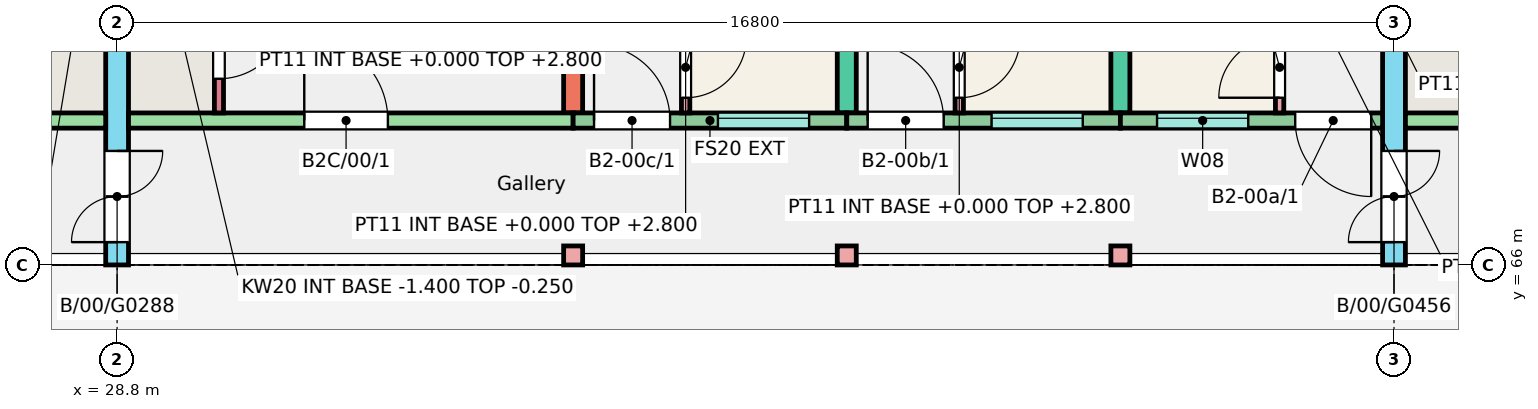
"""IFC4 building model, lengths in metres.
Left out: names, types, materials, properties, quantities, classifications, styles, units other than length and angle.
Written with IfcOpenShell. Run it as: python <this file> out.ifc"""

import sys

from ifc_helpers import new_model, si_unit, direction, frame, frame_2d, origin, origin_2d, place, context, subcontext, project, spatial, rectangle, extrude, element, fill, save


model = new_model("IFC4")
c1 = context("Model", 3, precision=1e-05, world=origin(), true_north=direction((0.0, 1.0)))
c2 = subcontext(c1, "Body", "Model", "MODEL_VIEW")
j1 = project(units=[si_unit("LENGTHUNIT", "METRE"), si_unit("PLANEANGLEUNIT", "RADIAN")], contexts=[c1])
p1 = place(None, origin())
s1 = spatial("IfcSite", under=j1, at=p1, CompositionType="ELEMENT")
p2 = place(p1, origin())
s2 = spatial("IfcBuilding", under=s1, at=p2, CompositionType="ELEMENT")
p3 = place(p2, origin())
s3 = spatial("IfcBuildingStorey", under=s2, at=p3, CompositionType="ELEMENT", Elevation=0.0)
p4 = place(p3, frame((28.8, 66.0, -0.25), z_axis=(0.0, 0.0, 1.0), x_axis=(0.0, 1.0, 0.0)))
e1 = element("IfcWall", 1, at=p4, inside=s3, PredefinedType="SHEAR", context=c2, shape_type="SweptSolid", body=[
    extrude(rectangle(XDim=11.0, YDim=0.3, at=frame_2d((5.5, 0.0))), origin(), (0.0, 0.0, 1.0), 3.25),
])
p5 = place(p4, frame((0.3, 0.0, 0.25)))
e2 = element("IfcOpeningElement", 2, at=p5, cuts=e1, PredefinedType="OPENING", context=c2, shape_type="SweptSolid", body=[
    extrude(rectangle(XDim=1.2, YDim=2.1, at=frame_2d((0.6, 1.05))), frame((0.0, 0.16, 0.0), z_axis=(0.0, -1.0, 0.0), x_axis=(1.0, 0.0, 0.0)), (0.0, 0.0, 1.0), 0.32),
])
for number, where, z_axis, x_axis in (
    (3, (34.8, 68.0, -0.25), (0.0, 0.0, 1.0), (0.0, 1.0, 0.0)),
    (4, (38.4, 68.0, -0.25), (0.0, 0.0, 1.0), (0.0, 1.0, 0.0)),
    (5, (42.0, 68.0, -0.25), (0.0, 0.0, 1.0), (0.0, 1.0, 0.0)),
):
    element("IfcWall", number, at=place(p3, frame(where, z_axis=z_axis, x_axis=x_axis)), inside=s3, PredefinedType="SHEAR", context=c2, shape_type="SweptSolid", body=[
        extrude(rectangle(XDim=9.0, YDim=0.25, at=frame_2d((4.5, 0.0))), origin(), (0.0, 0.0, 1.0), 3.25),
    ])
p6 = place(p3, frame((45.6, 66.0, -0.25), z_axis=(0.0, 0.0, 1.0), x_axis=(0.0, 1.0, 0.0)))
e6 = element("IfcWall", 6, at=p6, inside=s3, PredefinedType="SHEAR", context=c2, shape_type="SweptSolid", body=[
    extrude(rectangle(XDim=11.0, YDim=0.3, at=frame_2d((5.5, 0.0))), origin(), (0.0, 0.0, 1.0), 3.25),
])
p7 = place(p6, frame((0.3, 0.0, 0.25)))
e7 = element("IfcOpeningElement", 7, at=p7, cuts=e6, PredefinedType="OPENING", context=c2, shape_type="SweptSolid", body=[
    extrude(rectangle(XDim=1.2, YDim=2.1, at=frame_2d((0.6, 1.05))), frame((0.0, 0.16, 0.0), z_axis=(0.0, -1.0, 0.0), x_axis=(1.0, 0.0, 0.0)), (0.0, 0.0, 1.0), 0.32),
])
p8 = place(p3, frame((22.8, 67.9, -0.25), z_axis=(0.0, 0.0, 1.0), x_axis=(1.0, 0.0, 0.0)))
e8 = element("IfcWall", 8, at=p8, inside=s3, PredefinedType="SHEAR", context=c2, shape_type="SweptSolid", body=[
    extrude(rectangle(XDim=5.85, YDim=0.2, at=frame_2d((2.925, 0.0))), origin(), (0.0, 0.0, 1.0), 3.25),
])
p9 = place(p8, frame((2.438, 0.0, 0.25)))
e9 = element("IfcOpeningElement", 9, at=p9, cuts=e8, PredefinedType="OPENING", context=c2, shape_type="SweptSolid", body=[
    extrude(rectangle(XDim=1.1, YDim=2.1, at=frame_2d((0.55, 1.05))), frame((0.0, 0.11, 0.0), z_axis=(0.0, -1.0, 0.0), x_axis=(1.0, 0.0, 0.0)), (0.0, 0.0, 1.0), 0.22),
])
p10 = place(p3, frame((28.95, 67.9, -0.25), z_axis=(0.0, 0.0, 1.0), x_axis=(1.0, 0.0, 0.0)))
e10 = element("IfcWall", 10, at=p10, inside=s3, PredefinedType="SHEAR", context=c2, shape_type="SweptSolid", body=[
    extrude(rectangle(XDim=5.85, YDim=0.2, at=frame_2d((2.925, 0.0))), origin(), (0.0, 0.0, 1.0), 3.25),
])
p11 = place(p10, frame((2.312, 0.0, 0.25)))
e11 = element("IfcOpeningElement", 11, at=p11, cuts=e10, PredefinedType="OPENING", context=c2, shape_type="SweptSolid", body=[
    extrude(rectangle(XDim=1.1, YDim=2.1, at=frame_2d((0.55, 1.05))), frame((0.0, 0.11, 0.0), z_axis=(0.0, -1.0, 0.0), x_axis=(1.0, 0.0, 0.0)), (0.0, 0.0, 1.0), 0.22),
])
p12 = place(p3, frame((30.14, 68.0, -0.25), z_axis=(0.0, 0.0, 1.0), x_axis=(0.0, 1.0, 0.0)))
e12 = element("IfcWall", 12, at=p12, inside=s3, PredefinedType="SHEAR", context=c2, shape_type="SweptSolid", body=[
    extrude(rectangle(XDim=1.72, YDim=0.12, at=frame_2d((0.86, 0.0))), origin(), (0.0, 0.0, 1.0), 3.25),
])
p13 = place(p12, frame((0.45, 0.0, 0.25)))
e13 = element("IfcOpeningElement", 13, at=p13, cuts=e12, PredefinedType="OPENING", context=c2, shape_type="SweptSolid", body=[
    extrude(rectangle(XDim=0.9, YDim=2.1, at=frame_2d((0.45, 1.05))), frame((0.0, 0.07, 0.0), z_axis=(0.0, -1.0, 0.0), x_axis=(1.0, 0.0, 0.0)), (0.0, 0.0, 1.0), 0.14),
])
p14 = place(p3, frame((34.8, 67.9, -0.25), z_axis=(0.0, 0.0, 1.0), x_axis=(1.0, 0.0, 0.0)))
e14 = element("IfcWall", 14, at=p14, inside=s3, PredefinedType="SOLIDWALL", context=c2, shape_type="SweptSolid", body=[
    extrude(rectangle(XDim=3.6, YDim=0.2, at=frame_2d((1.8, 0.0))), origin(), (0.0, 0.0, 1.0), 3.25),
])
p15 = place(p14, frame((1.905, 0.0, 1.35)))
e15 = element("IfcOpeningElement", 15, at=p15, cuts=e14, PredefinedType="OPENING", context=c2, shape_type="SweptSolid", body=[
    extrude(rectangle(XDim=1.2, YDim=1.3, at=frame_2d((0.6, 0.65))), frame((0.0, 0.11, 0.0), z_axis=(0.0, -1.0, 0.0), x_axis=(1.0, 0.0, 0.0)), (0.0, 0.0, 1.0), 0.22),
])
p16 = place(p14, frame((0.275, 0.0, 0.25)))
e16 = element("IfcOpeningElement", 16, at=p16, cuts=e14, PredefinedType="OPENING", context=c2, shape_type="SweptSolid", body=[
    extrude(rectangle(XDim=1.0, YDim=2.1, at=frame_2d((0.5, 1.05))), frame((0.0, 0.11, 0.0), z_axis=(0.0, -1.0, 0.0), x_axis=(1.0, 0.0, 0.0)), (0.0, 0.0, 1.0), 0.22),
])
p17 = place(p3, frame((38.4, 67.9, -0.25), z_axis=(0.0, 0.0, 1.0), x_axis=(1.0, 0.0, 0.0)))
e17 = element("IfcWall", 17, at=p17, inside=s3, PredefinedType="SOLIDWALL", context=c2, shape_type="SweptSolid", body=[
    extrude(rectangle(XDim=3.6, YDim=0.2, at=frame_2d((1.8, 0.0))), origin(), (0.0, 0.0, 1.0), 3.25),
])
p18 = place(p17, frame((1.905, 0.0, 1.35)))
e18 = element("IfcOpeningElement", 18, at=p18, cuts=e17, PredefinedType="OPENING", context=c2, shape_type="SweptSolid", body=[
    extrude(rectangle(XDim=1.2, YDim=1.3, at=frame_2d((0.6, 0.65))), frame((0.0, 0.11, 0.0), z_axis=(0.0, -1.0, 0.0), x_axis=(1.0, 0.0, 0.0)), (0.0, 0.0, 1.0), 0.22),
])
p19 = place(p17, frame((0.275, 0.0, 0.25)))
e19 = element("IfcOpeningElement", 19, at=p19, cuts=e17, PredefinedType="OPENING", context=c2, shape_type="SweptSolid", body=[
    extrude(rectangle(XDim=1.0, YDim=2.1, at=frame_2d((0.5, 1.05))), frame((0.0, 0.11, 0.0), z_axis=(0.0, -1.0, 0.0), x_axis=(1.0, 0.0, 0.0)), (0.0, 0.0, 1.0), 0.22),
])
p20 = place(p3, frame((42.0, 67.9, -0.25), z_axis=(0.0, 0.0, 1.0), x_axis=(1.0, 0.0, 0.0)))
e20 = element("IfcWall", 20, at=p20, inside=s3, PredefinedType="SOLIDWALL", context=c2, shape_type="SweptSolid", body=[
    extrude(rectangle(XDim=3.45, YDim=0.2, at=frame_2d((1.725, 0.0))), origin(), (0.0, 0.0, 1.0), 3.25),
])
p21 = place(p20, frame((0.482, 0.0, 1.35)))
e21 = element("IfcOpeningElement", 21, at=p21, cuts=e20, PredefinedType="OPENING", context=c2, shape_type="SweptSolid", body=[
    extrude(rectangle(XDim=1.2, YDim=1.3, at=frame_2d((0.6, 0.65))), frame((0.0, 0.11, 0.0), z_axis=(0.0, -1.0, 0.0), x_axis=(1.0, 0.0, 0.0)), (0.0, 0.0, 1.0), 0.22),
])
p22 = place(p20, frame((2.3, 0.0, 0.25)))
e22 = element("IfcOpeningElement", 22, at=p22, cuts=e20, PredefinedType="OPENING", context=c2, shape_type="SweptSolid", body=[
    extrude(rectangle(XDim=1.0, YDim=2.1, at=frame_2d((0.5, 1.05))), frame((0.0, 0.11, 0.0), z_axis=(0.0, -1.0, 0.0), x_axis=(1.0, 0.0, 0.0)), (0.0, 0.0, 1.0), 0.22),
])
p23 = place(p3, frame((45.75, 67.9, -0.25), z_axis=(0.0, 0.0, 1.0), x_axis=(1.0, 0.0, 0.0)))
e23 = element("IfcWall", 23, at=p23, inside=s3, PredefinedType="SHEAR", context=c2, shape_type="SweptSolid", body=[
    extrude(rectangle(XDim=5.85, YDim=0.2, at=frame_2d((2.925, 0.0))), origin(), (0.0, 0.0, 1.0), 3.25),
])
p24 = place(p23, frame((2.312, 0.0, 0.25)))
e24 = element("IfcOpeningElement", 24, at=p24, cuts=e23, PredefinedType="OPENING", context=c2, shape_type="SweptSolid", body=[
    extrude(rectangle(XDim=1.1, YDim=2.1, at=frame_2d((0.55, 1.05))), frame((0.0, 0.11, 0.0), z_axis=(0.0, -1.0, 0.0), x_axis=(1.0, 0.0, 0.0)), (0.0, 0.0, 1.0), 0.22),
])
for number, where, z_axis, x_axis in (
    (25, (34.8, 66.125, -0.25), (0.0, 0.0, 1.0), (1.0, 0.0, 0.0)),
    (26, (38.4, 66.125, -0.25), (0.0, 0.0, 1.0), (1.0, 0.0, 0.0)),
    (27, (42.0, 66.125, -0.25), (0.0, 0.0, 1.0), (1.0, 0.0, 0.0)),
):
    element("IfcColumn", number, at=place(p3, frame(where, z_axis=z_axis, x_axis=x_axis)), inside=s3, PredefinedType="COLUMN", context=c2, shape_type="SweptSolid", body=[
        extrude(rectangle(XDim=0.25, YDim=0.25, at=origin_2d()), origin(), (0.0, 0.0, 1.0), 3.25),
    ])
p25 = place(p3, frame((44.095, 68.0, 0.0), z_axis=(0.0, 0.0, 1.0), x_axis=(0.0, 1.0, 0.0)))
e28 = element("IfcWall", 28, at=p25, inside=s3, PredefinedType="PARTITIONING", context=c2, shape_type="SweptSolid", body=[
    extrude(rectangle(XDim=4.7, YDim=0.11, at=frame_2d((2.35, 0.0))), origin(), (0.0, 0.0, 1.0), 2.8),
])
p26 = place(p25, frame((0.2, 0.0, 0.0)))
e29 = element("IfcOpeningElement", 29, at=p26, cuts=e28, PredefinedType="OPENING", context=c2, shape_type="SweptSolid", body=[
    extrude(rectangle(XDim=0.8, YDim=2.1, at=frame_2d((0.4, 1.05))), frame((0.0, 0.065, 0.0), z_axis=(0.0, -1.0, 0.0), x_axis=(1.0, 0.0, 0.0)), (0.0, 0.0, 1.0), 0.13),
])
p27 = place(p25, frame((3.75, 0.0, 0.0)))
e30 = element("IfcOpeningElement", 30, at=p27, cuts=e28, PredefinedType="OPENING", context=c2, shape_type="SweptSolid", body=[
    extrude(rectangle(XDim=0.8, YDim=2.1, at=frame_2d((0.4, 1.05))), frame((0.0, 0.065, 0.0), z_axis=(0.0, -1.0, 0.0), x_axis=(1.0, 0.0, 0.0)), (0.0, 0.0, 1.0), 0.13),
])
p28 = place(p3, frame((39.88, 68.0, 0.0), z_axis=(0.0, 0.0, 1.0), x_axis=(0.0, 1.0, 0.0)))
e31 = element("IfcWall", 31, at=p28, inside=s3, PredefinedType="PARTITIONING", context=c2, shape_type="SweptSolid", body=[
    extrude(rectangle(XDim=4.3, YDim=0.11, at=frame_2d((2.15, 0.0))), origin(), (0.0, 0.0, 1.0), 2.8),
])
p29 = place(p28, frame((0.2, 0.0, 0.0)))
e32 = element("IfcOpeningElement", 32, at=p29, cuts=e31, PredefinedType="OPENING", context=c2, shape_type="SweptSolid", body=[
    extrude(rectangle(XDim=0.8, YDim=2.1, at=frame_2d((0.4, 1.05))), frame((0.0, 0.065, 0.0), z_axis=(0.0, -1.0, 0.0), x_axis=(1.0, 0.0, 0.0)), (0.0, 0.0, 1.0), 0.13),
])
p30 = place(p28, frame((3.35, 0.0, 0.0)))
e33 = element("IfcOpeningElement", 33, at=p30, cuts=e31, PredefinedType="OPENING", context=c2, shape_type="SweptSolid", body=[
    extrude(rectangle(XDim=0.8, YDim=2.1, at=frame_2d((0.4, 1.05))), frame((0.0, 0.065, 0.0), z_axis=(0.0, -1.0, 0.0), x_axis=(1.0, 0.0, 0.0)), (0.0, 0.0, 1.0), 0.13),
])
p31 = place(p3, frame((36.28, 68.0, 0.0), z_axis=(0.0, 0.0, 1.0), x_axis=(0.0, 1.0, 0.0)))
e34 = element("IfcWall", 34, at=p31, inside=s3, PredefinedType="PARTITIONING", context=c2, shape_type="SweptSolid", body=[
    extrude(rectangle(XDim=4.3, YDim=0.11, at=frame_2d((2.15, 0.0))), origin(), (0.0, 0.0, 1.0), 2.8),
])
p32 = place(p31, frame((0.2, 0.0, 0.0)))
e35 = element("IfcOpeningElement", 35, at=p32, cuts=e34, PredefinedType="OPENING", context=c2, shape_type="SweptSolid", body=[
    extrude(rectangle(XDim=0.8, YDim=2.1, at=frame_2d((0.4, 1.05))), frame((0.0, 0.065, 0.0), z_axis=(0.0, -1.0, 0.0), x_axis=(1.0, 0.0, 0.0)), (0.0, 0.0, 1.0), 0.13),
])
p33 = place(p31, frame((3.35, 0.0, 0.0)))
e36 = element("IfcOpeningElement", 36, at=p33, cuts=e34, PredefinedType="OPENING", context=c2, shape_type="SweptSolid", body=[
    extrude(rectangle(XDim=0.8, YDim=2.1, at=frame_2d((0.4, 1.05))), frame((0.0, 0.065, 0.0), z_axis=(0.0, -1.0, 0.0), x_axis=(1.0, 0.0, 0.0)), (0.0, 0.0, 1.0), 0.13),
])
p34 = place(p21, origin())
e37 = element("IfcWindow", 37, at=p34, inside=s3, PartitioningType="SINGLE_PANEL", PredefinedType="WINDOW", context=c2, shape_type="SweptSolid", body=[
    extrude(rectangle(XDim=1.2, YDim=1.3, at=frame_2d((0.6, 0.65))), frame((0.0, 0.06, 0.0), z_axis=(0.0, -1.0, 0.0), x_axis=(1.0, 0.0, 0.0)), (0.0, 0.0, 1.0), 0.06),
])
fill(e21, e37)
p35 = place(p18, origin())
e38 = element("IfcWindow", 38, at=p35, inside=s3, PartitioningType="SINGLE_PANEL", PredefinedType="WINDOW", context=c2, shape_type="SweptSolid", body=[
    extrude(rectangle(XDim=1.2, YDim=1.3, at=frame_2d((0.6, 0.65))), frame((0.0, 0.06, 0.0), z_axis=(0.0, -1.0, 0.0), x_axis=(1.0, 0.0, 0.0)), (0.0, 0.0, 1.0), 0.06),
])
fill(e18, e38)
p36 = place(p15, origin())
e39 = element("IfcWindow", 39, at=p36, inside=s3, PartitioningType="SINGLE_PANEL", PredefinedType="WINDOW", context=c2, shape_type="SweptSolid", body=[
    extrude(rectangle(XDim=1.2, YDim=1.3, at=frame_2d((0.6, 0.65))), frame((0.0, 0.06, 0.0), z_axis=(0.0, -1.0, 0.0), x_axis=(1.0, 0.0, 0.0)), (0.0, 0.0, 1.0), 0.06),
])
fill(e15, e39)
p37 = place(p22, origin())
e40 = element("IfcDoor", 40, at=p37, inside=s3, OperationType="SINGLE_SWING_RIGHT", PredefinedType="DOOR", context=c2, shape_type="SweptSolid", body=[
    extrude(rectangle(XDim=1.0, YDim=2.1, at=frame_2d((0.5, 1.05))), frame((0.0, 0.025, 0.0), z_axis=(0.0, -1.0, 0.0), x_axis=(1.0, 0.0, 0.0)), (0.0, 0.0, 1.0), 0.05),
])
fill(e22, e40)
p38 = place(p26, origin())
e41 = element("IfcDoor", 41, at=p38, inside=s3, OperationType="SINGLE_SWING_LEFT", PredefinedType="DOOR", context=c2, shape_type="SweptSolid", body=[
    extrude(rectangle(XDim=0.8, YDim=2.1, at=frame_2d((0.4, 1.05))), frame((0.0, 0.025, 0.0), z_axis=(0.0, -1.0, 0.0), x_axis=(1.0, 0.0, 0.0)), (0.0, 0.0, 1.0), 0.05),
])
fill(e29, e41)
p39 = place(p19, origin())
e42 = element("IfcDoor", 42, at=p39, inside=s3, OperationType="SINGLE_SWING_LEFT", PredefinedType="DOOR", context=c2, shape_type="SweptSolid", body=[
    extrude(rectangle(XDim=1.0, YDim=2.1, at=frame_2d((0.5, 1.05))), frame((0.0, 0.025, 0.0), z_axis=(0.0, -1.0, 0.0), x_axis=(1.0, 0.0, 0.0)), (0.0, 0.0, 1.0), 0.05),
])
fill(e19, e42)
p40 = place(p29, origin())
e43 = element("IfcDoor", 43, at=p40, inside=s3, OperationType="SINGLE_SWING_RIGHT", PredefinedType="DOOR", context=c2, shape_type="SweptSolid", body=[
    extrude(rectangle(XDim=0.8, YDim=2.1, at=frame_2d((0.4, 1.05))), frame((0.0, 0.025, 0.0), z_axis=(0.0, -1.0, 0.0), x_axis=(1.0, 0.0, 0.0)), (0.0, 0.0, 1.0), 0.05),
])
fill(e32, e43)
p41 = place(p16, origin())
e44 = element("IfcDoor", 44, at=p41, inside=s3, OperationType="SINGLE_SWING_LEFT", PredefinedType="DOOR", context=c2, shape_type="SweptSolid", body=[
    extrude(rectangle(XDim=1.0, YDim=2.1, at=frame_2d((0.5, 1.05))), frame((0.0, 0.025, 0.0), z_axis=(0.0, -1.0, 0.0), x_axis=(1.0, 0.0, 0.0)), (0.0, 0.0, 1.0), 0.05),
])
fill(e16, e44)
p42 = place(p32, origin())
e45 = element("IfcDoor", 45, at=p42, inside=s3, OperationType="SINGLE_SWING_RIGHT", PredefinedType="DOOR", context=c2, shape_type="SweptSolid", body=[
    extrude(rectangle(XDim=0.8, YDim=2.1, at=frame_2d((0.4, 1.05))), frame((0.0, 0.025, 0.0), z_axis=(0.0, -1.0, 0.0), x_axis=(1.0, 0.0, 0.0)), (0.0, 0.0, 1.0), 0.05),
])
fill(e35, e45)
p43 = place(p11, origin())
e46 = element("IfcDoor", 46, at=p43, inside=s3, OperationType="SINGLE_SWING_LEFT", PredefinedType="DOOR", context=c2, shape_type="SweptSolid", body=[
    extrude(rectangle(XDim=1.1, YDim=2.1, at=frame_2d((0.55, 1.05))), frame((0.0, 0.025, 0.0), z_axis=(0.0, -1.0, 0.0), x_axis=(1.0, 0.0, 0.0)), (0.0, 0.0, 1.0), 0.05),
])
fill(e11, e46)
p44 = place(p13, origin())
e47 = element("IfcDoor", 47, at=p44, inside=s3, OperationType="SINGLE_SWING_RIGHT", PredefinedType="DOOR", context=c2, shape_type="SweptSolid", body=[
    extrude(rectangle(XDim=0.9, YDim=2.1, at=frame_2d((0.45, 1.05))), frame((0.0, 0.025, 0.0), z_axis=(0.0, -1.0, 0.0), x_axis=(1.0, 0.0, 0.0)), (0.0, 0.0, 1.0), 0.05),
])
fill(e13, e47)
p45 = place(p5, origin())
e48 = element("IfcDoor", 48, at=p45, inside=s3, OperationType="DOUBLE_DOOR_SINGLE_SWING", PredefinedType="DOOR", context=c2, shape_type="SweptSolid", body=[
    extrude(rectangle(XDim=1.2, YDim=2.1, at=frame_2d((0.6, 1.05))), frame((0.0, 0.025, 0.0), z_axis=(0.0, -1.0, 0.0), x_axis=(1.0, 0.0, 0.0)), (0.0, 0.0, 1.0), 0.05),
])
fill(e2, e48)
p46 = place(p7, origin())
e49 = element("IfcDoor", 49, at=p46, inside=s3, OperationType="DOUBLE_DOOR_SINGLE_SWING", PredefinedType="DOOR", context=c2, shape_type="SweptSolid", body=[
    extrude(rectangle(XDim=1.2, YDim=2.1, at=frame_2d((0.6, 1.05))), frame((0.0, 0.025, 0.0), z_axis=(0.0, -1.0, 0.0), x_axis=(1.0, 0.0, 0.0)), (0.0, 0.0, 1.0), 0.05),
])
fill(e7, e49)
save(model, sys.argv[1])
